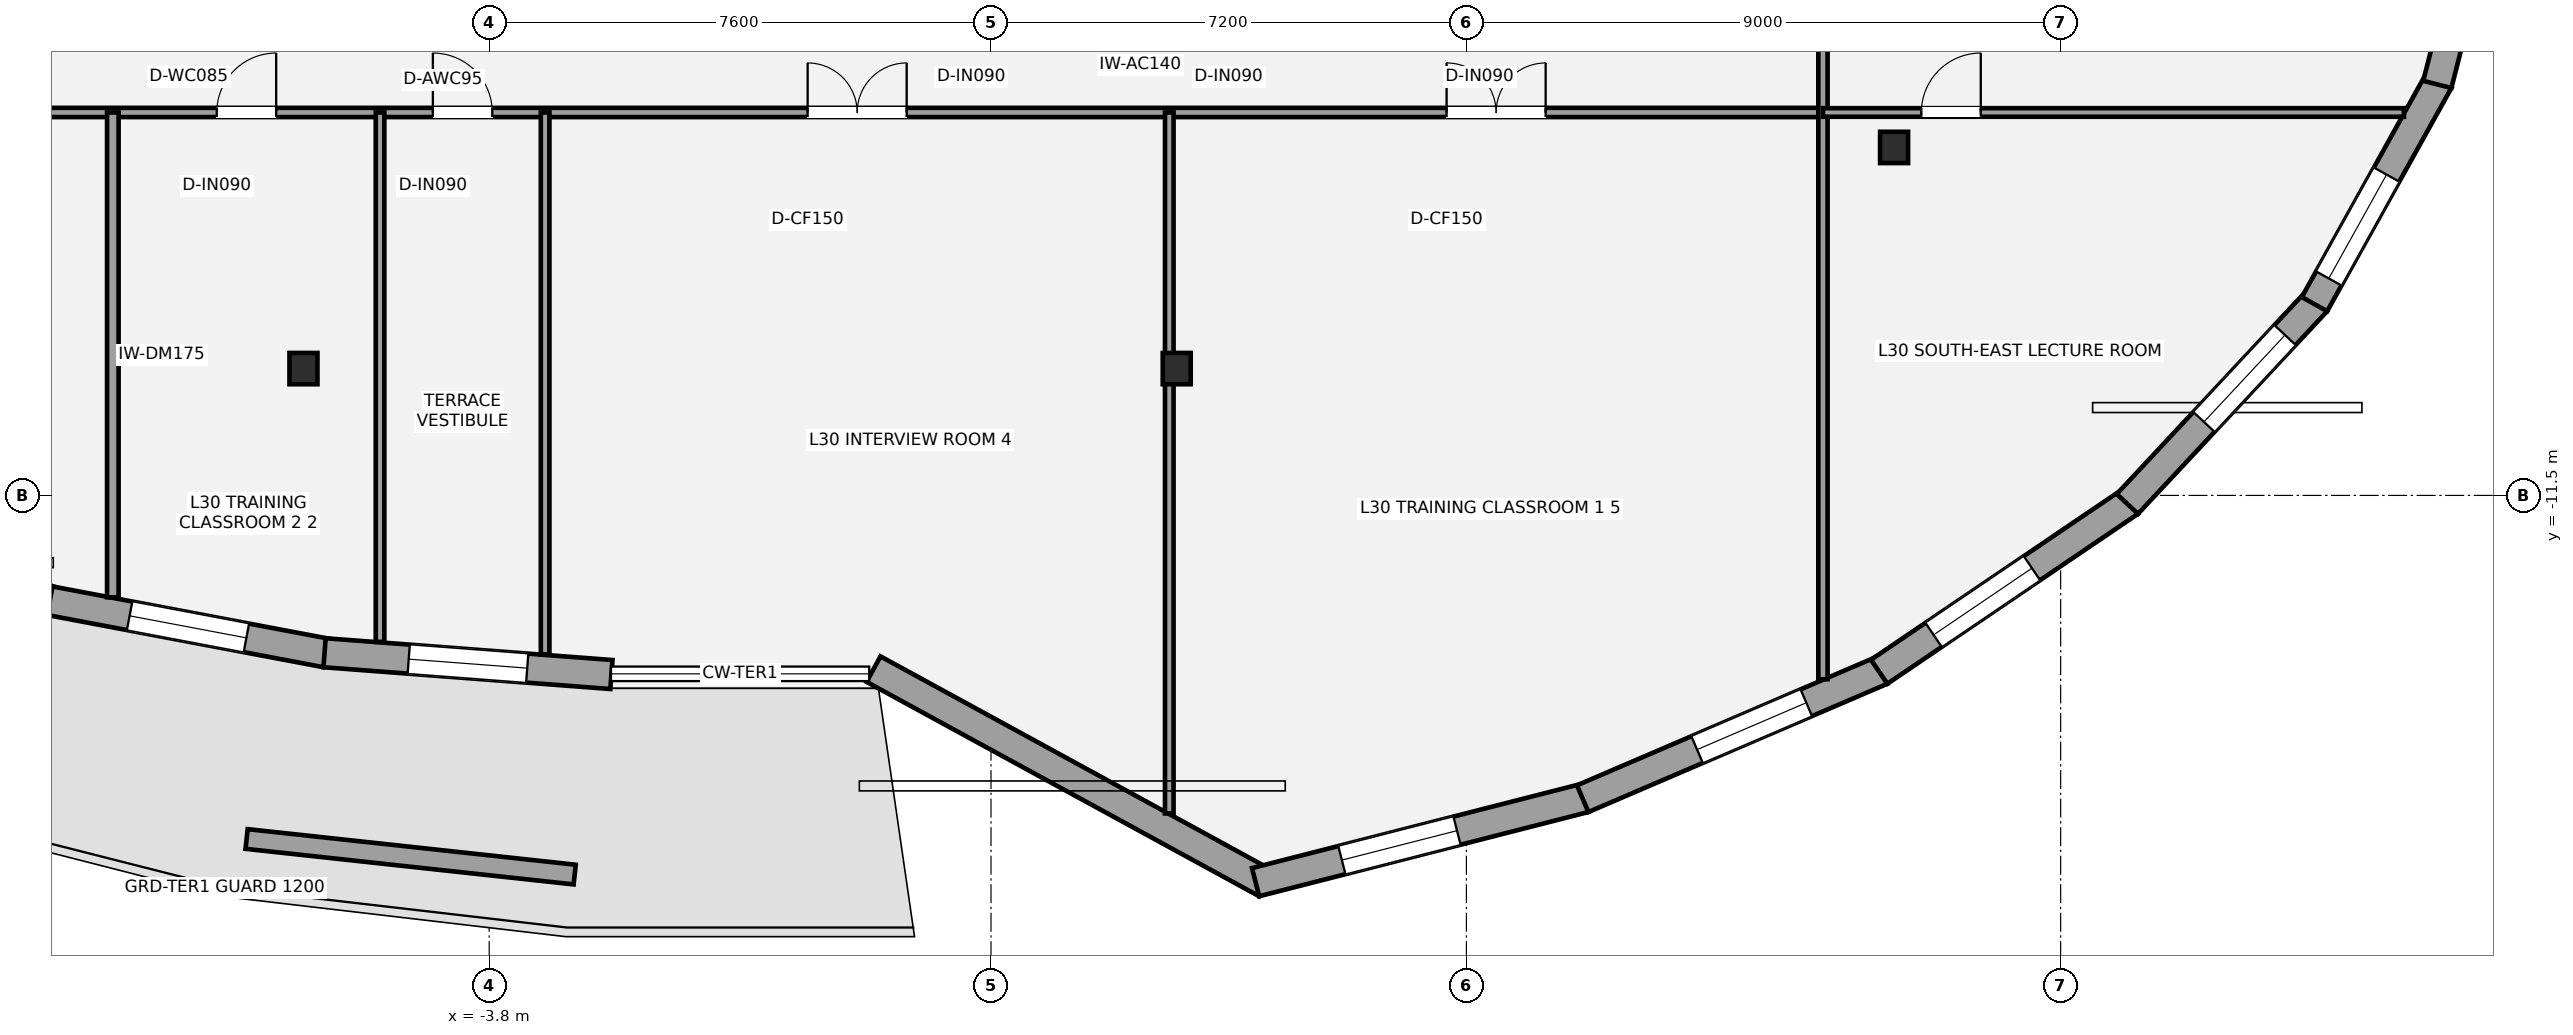
"""IFC4 building model, lengths in metres.
Left out: names, types, materials, properties, quantities, classifications, styles, units other than length and angle.
Written with IfcOpenShell. Run it as: python <this file> out.ifc"""

import sys

from ifc_helpers import new_model, si_unit, direction, frame, frame_2d, origin, origin_2d, place, context, subcontext, project, spatial, rectangle, i_section, extrude, element, fill, save


model = new_model("IFC4")
c1 = context("Model", 3, precision=1e-05, world=origin(), true_north=direction((0.0, 1.0)))
c2 = subcontext(c1, "Body", "Model", "MODEL_VIEW")
j1 = project(units=[si_unit("LENGTHUNIT", "METRE"), si_unit("PLANEANGLEUNIT", "RADIAN")], contexts=[c1])
p1 = place(None, origin())
s1 = spatial("IfcSite", under=j1, at=p1, CompositionType="ELEMENT")
p2 = place(p1, origin())
s2 = spatial("IfcBuilding", under=s1, at=p2, CompositionType="ELEMENT")
p3 = place(p2, frame((0.0, 0.0, 114.1)))
s3 = spatial("IfcBuildingStorey", under=s2, at=p3, CompositionType="ELEMENT", Elevation=114.1)
for number, where, z_axis, x_axis in (
    (1, (-6.613, -9.579, 0.0), (0.0, 0.0, 1.0), (1.0, 0.0, 0.0)),
    (2, (6.613, -9.579, 0.0), (0.0, 0.0, 1.0), (1.0, 0.0, 0.0)),
    (3, (17.477, -6.229, 0.0), (0.0, 0.0, 1.0), (1.0, 0.0, 0.0)),
):
    element("IfcColumn", number, at=place(p3, frame(where, z_axis=z_axis, x_axis=x_axis)), inside=s3, PredefinedType="COLUMN", context=c2, shape_type="SweptSolid", body=[
        extrude(i_section(OverallWidth=0.424, OverallDepth=0.474, WebThickness=0.048, FlangeThickness=0.077, at=origin_2d()), origin(), (0.0, 0.0, 1.0), 3.5),
    ])
p4 = place(p3, frame((-10.423, -13.104, 0.0), z_axis=(0.0, 0.0, 1.0), x_axis=(-0.944167257662, 0.329466522668, 0.0)))
e4 = element("IfcWall", 4, at=p4, inside=s3, PredefinedType="STANDARD", context=c2, shape_type="SweptSolid", body=[
    extrude(rectangle(XDim=4.184, YDim=0.44, at=frame_2d((2.092, 0.0))), origin(), (0.0, 0.0, 1.0), 2.532),
])
p5 = place(p4, frame((1.542, 0.0, 0.0)))
e5 = element("IfcOpeningElement", 5, at=p5, cuts=e4, PredefinedType="OPENING", context=c2, shape_type="SweptSolid", body=[
    extrude(rectangle(XDim=1.1, YDim=2.15, at=frame_2d((0.55, 1.075))), frame((0.0, 0.23, 0.0), z_axis=(0.0, -1.0, 0.0), x_axis=(1.0, 0.0, 0.0)), (0.0, 0.0, 1.0), 0.46),
])
p6 = place(p3, frame((-6.269, -13.886, 0.0), z_axis=(0.0, 0.0, 1.0), x_axis=(-0.982602489318, 0.185721156539, 0.0)))
e6 = element("IfcWall", 6, at=p6, inside=s3, PredefinedType="STANDARD", context=c2, shape_type="SweptSolid", body=[
    extrude(rectangle(XDim=4.259, YDim=0.44, at=frame_2d((2.13, 0.0))), origin(), (0.0, 0.0, 1.0), 2.532),
])
p7 = place(p6, frame((1.229, 0.0, 0.65)))
e7 = element("IfcOpeningElement", 7, at=p7, cuts=e6, PredefinedType="OPENING", context=c2, shape_type="SweptSolid", body=[
    extrude(rectangle(XDim=1.8, YDim=1.7, at=frame_2d((0.9, 0.85))), frame((0.0, 0.23, 0.0), z_axis=(0.0, -1.0, 0.0), x_axis=(1.0, 0.0, 0.0)), (0.0, 0.0, 1.0), 0.46),
])
p8 = place(p3, frame((-1.949, -14.213, 0.0), z_axis=(0.0, 0.0, 1.0), x_axis=(-0.997130139105, 0.075706576258, 0.0)))
e8 = element("IfcWall", 8, at=p8, inside=s3, PredefinedType="STANDARD", context=c2, shape_type="SweptSolid", body=[
    extrude(rectangle(XDim=4.357, YDim=0.44, at=frame_2d((2.178, 0.0))), origin(), (0.0, 0.0, 1.0), 2.532),
])
p9 = place(p8, frame((1.278, 0.0, 0.65)))
e9 = element("IfcOpeningElement", 9, at=p9, cuts=e8, PredefinedType="OPENING", context=c2, shape_type="SweptSolid", body=[
    extrude(rectangle(XDim=1.8, YDim=1.7, at=frame_2d((0.9, 0.85))), frame((0.0, 0.23, 0.0), z_axis=(0.0, -1.0, 0.0), x_axis=(1.0, 0.0, 0.0)), (0.0, 0.0, 1.0), 0.46),
])
p10 = place(p3, frame((7.967, -17.378, 0.0), z_axis=(0.0, 0.0, 1.0), x_axis=(-0.877693058441, 0.479223220602, 0.0)))
e10 = element("IfcWall", 10, at=p10, inside=s3, PredefinedType="STANDARD", context=c2, shape_type="SweptSolid", body=[
    extrude(rectangle(XDim=6.775, YDim=0.44, at=frame_2d((3.388, 0.0))), origin(), (0.0, 0.0, 1.0), 2.528),
])
p11 = place(p3, frame((12.793, -16.082, 0.0), z_axis=(0.0, 0.0, 1.0), x_axis=(-0.968802439575, -0.247834285507, 0.0)))
e11 = element("IfcWall", 11, at=p11, inside=s3, PredefinedType="STANDARD", context=c2, shape_type="SweptSolid", body=[
    extrude(rectangle(XDim=5.146, YDim=0.44, at=frame_2d((2.573, 0.0))), origin(), (0.0, 0.0, 1.0), 2.528),
])
p12 = place(p11, frame((1.998, 0.0, 0.65)))
e12 = element("IfcOpeningElement", 12, at=p12, cuts=e11, PredefinedType="OPENING", context=c2, shape_type="SweptSolid", body=[
    extrude(rectangle(XDim=1.8, YDim=1.7, at=frame_2d((0.9, 0.85))), frame((0.0, 0.23, 0.0), z_axis=(0.0, -1.0, 0.0), x_axis=(1.0, 0.0, 0.0)), (0.0, 0.0, 1.0), 0.46),
])
p13 = place(p3, frame((17.288, -14.151, 0.0), z_axis=(0.0, 0.0, 1.0), x_axis=(-0.919001414266, -0.39425423343, 0.0)))
e13 = element("IfcWall", 13, at=p13, inside=s3, PredefinedType="STANDARD", context=c2, shape_type="SweptSolid", body=[
    extrude(rectangle(XDim=4.926, YDim=0.44, at=frame_2d((2.463, 0.0))), origin(), (0.0, 0.0, 1.0), 2.528),
])
p14 = place(p13, frame((1.241, 0.0, 0.65)))
e14 = element("IfcOpeningElement", 14, at=p14, cuts=e13, PredefinedType="OPENING", context=c2, shape_type="SweptSolid", body=[
    extrude(rectangle(XDim=1.8, YDim=1.7, at=frame_2d((0.9, 0.85))), frame((0.0, 0.23, 0.0), z_axis=(0.0, -1.0, 0.0), x_axis=(1.0, 0.0, 0.0)), (0.0, 0.0, 1.0), 0.46),
])
p15 = place(p3, frame((21.048, -11.597, 0.0), z_axis=(0.0, 0.0, 1.0), x_axis=(-0.827717717125, -0.561144705719, 0.0)))
e15 = element("IfcWall", 15, at=p15, inside=s3, PredefinedType="STANDARD", context=c2, shape_type="SweptSolid", body=[
    extrude(rectangle(XDim=4.587, YDim=0.44, at=frame_2d((2.293, 0.0))), origin(), (0.0, 0.0, 1.0), 2.528),
])
p16 = place(p15, frame((1.791, 0.0, 0.65)))
e16 = element("IfcOpeningElement", 16, at=p16, cuts=e15, PredefinedType="OPENING", context=c2, shape_type="SweptSolid", body=[
    extrude(rectangle(XDim=1.8, YDim=1.7, at=frame_2d((0.9, 0.85))), frame((0.0, 0.23, 0.0), z_axis=(0.0, -1.0, 0.0), x_axis=(1.0, 0.0, 0.0)), (0.0, 0.0, 1.0), 0.46),
])
p17 = place(p3, frame((23.875, -8.56, 0.0), z_axis=(0.0, 0.0, 1.0), x_axis=(-0.682353469166, -0.73102239577, 0.0)))
e17 = element("IfcWall", 17, at=p17, inside=s3, PredefinedType="STANDARD", context=c2, shape_type="SweptSolid", body=[
    extrude(rectangle(XDim=4.199, YDim=0.44, at=frame_2d((2.099, 0.0))), origin(), (0.0, 0.0, 1.0), 2.528),
])
p18 = place(p17, frame((0.7, 0.0, 0.65)))
e18 = element("IfcOpeningElement", 18, at=p18, cuts=e17, PredefinedType="OPENING", context=c2, shape_type="SweptSolid", body=[
    extrude(rectangle(XDim=1.8, YDim=1.7, at=frame_2d((0.9, 0.85))), frame((0.0, 0.23, 0.0), z_axis=(0.0, -1.0, 0.0), x_axis=(1.0, 0.0, 0.0)), (0.0, 0.0, 1.0), 0.46),
])
p19 = place(p3, frame((25.725, -5.223, 0.0), z_axis=(0.0, 0.0, 1.0), x_axis=(-0.486285838125, -0.873799796086, 0.0)))
e19 = element("IfcWall", 19, at=p19, inside=s3, PredefinedType="STANDARD", context=c2, shape_type="SweptSolid", body=[
    extrude(rectangle(XDim=3.868, YDim=0.44, at=frame_2d((1.934, 0.0))), origin(), (0.0, 0.0, 1.0), 2.528),
])
p20 = place(p19, frame((1.623, 0.0, 0.65)))
e20 = element("IfcOpeningElement", 20, at=p20, cuts=e19, PredefinedType="OPENING", context=c2, shape_type="SweptSolid", body=[
    extrude(rectangle(XDim=1.8, YDim=1.7, at=frame_2d((0.9, 0.85))), frame((0.0, 0.23, 0.0), z_axis=(0.0, -1.0, 0.0), x_axis=(1.0, 0.0, 0.0)), (0.0, 0.0, 1.0), 0.46),
])
p21 = place(p3, frame((26.607, -1.736, 0.0), z_axis=(0.0, 0.0, 1.0), x_axis=(-0.247172296022, -0.968971545547, 0.0)))
e21 = element("IfcWall", 21, at=p21, inside=s3, PredefinedType="STANDARD", context=c2, shape_type="SweptSolid", body=[
    extrude(rectangle(XDim=3.653, YDim=0.44, at=frame_2d((1.826, 0.0))), origin(), (0.0, 0.0, 1.0), 2.528),
])
p22 = place(p21, frame((0.345, 0.0, 0.65)))
e22 = element("IfcOpeningElement", 22, at=p22, cuts=e21, PredefinedType="OPENING", context=c2, shape_type="SweptSolid", body=[
    extrude(rectangle(XDim=1.8, YDim=1.7, at=frame_2d((0.9, 0.85))), frame((0.0, 0.23, 0.0), z_axis=(0.0, -1.0, 0.0), x_axis=(1.0, 0.0, 0.0)), (0.0, 0.0, 1.0), 0.46),
])
p23 = place(p3, frame((-7.474, -16.704, 0.0), z_axis=(0.0, 0.0, 1.0), x_axis=(0.994167482167, -0.107847194685, 0.0)))
e23 = element("IfcWall", 23, at=p23, inside=s3, PredefinedType="PARAPET", context=c2, shape_type="SweptSolid", body=[
    extrude(rectangle(XDim=4.998, YDim=0.3, at=frame_2d((2.499, 0.0))), origin(), (0.0, 0.0, 1.0), 0.45),
])
p24 = place(p3, frame((-17.8, -5.7, 0.0), z_axis=(0.0, 0.0, 1.0), x_axis=(1.0, 0.0, 0.0)))
e24 = element("IfcWall", 24, at=p24, inside=s3, PredefinedType="PARTITIONING", context=c2, shape_type="SweptSolid", body=[
    extrude(rectangle(XDim=34.2, YDim=0.14, at=frame_2d((17.1, 0.0))), origin(), (0.0, 0.0, 1.0), 2.688),
])
p25 = place(p24, frame((3.4, 0.0, 0.0)))
e25 = element("IfcOpeningElement", 25, at=p25, cuts=e24, PredefinedType="OPENING", context=c2, shape_type="SweptSolid", body=[
    extrude(rectangle(XDim=1.5, YDim=2.15, at=frame_2d((0.75, 1.075))), frame((0.0, 0.08, 0.0), z_axis=(0.0, -1.0, 0.0), x_axis=(1.0, 0.0, 0.0)), (0.0, 0.0, 1.0), 0.16),
])
p26 = place(p24, frame((9.874, 0.0, 0.0)))
e26 = element("IfcOpeningElement", 26, at=p26, cuts=e24, PredefinedType="OPENING", context=c2, shape_type="SweptSolid", body=[
    extrude(rectangle(XDim=0.9, YDim=2.1, at=frame_2d((0.45, 1.05))), frame((0.0, 0.08, 0.0), z_axis=(0.0, -1.0, 0.0), x_axis=(1.0, 0.0, 0.0)), (0.0, 0.0, 1.0), 0.16),
])
p27 = place(p24, frame((13.147, 0.0, 0.0)))
e27 = element("IfcOpeningElement", 27, at=p27, cuts=e24, PredefinedType="OPENING", context=c2, shape_type="SweptSolid", body=[
    extrude(rectangle(XDim=0.9, YDim=2.1, at=frame_2d((0.45, 1.05))), frame((0.0, 0.08, 0.0), z_axis=(0.0, -1.0, 0.0), x_axis=(1.0, 0.0, 0.0)), (0.0, 0.0, 1.0), 0.16),
])
p28 = place(p24, frame((18.823, 0.0, 0.0)))
e28 = element("IfcOpeningElement", 28, at=p28, cuts=e24, PredefinedType="OPENING", context=c2, shape_type="SweptSolid", body=[
    extrude(rectangle(XDim=1.5, YDim=2.15, at=frame_2d((0.75, 1.075))), frame((0.0, 0.08, 0.0), z_axis=(0.0, -1.0, 0.0), x_axis=(1.0, 0.0, 0.0)), (0.0, 0.0, 1.0), 0.16),
])
p29 = place(p24, frame((28.5, 0.0, 0.0)))
e29 = element("IfcOpeningElement", 29, at=p29, cuts=e24, PredefinedType="OPENING", context=c2, shape_type="SweptSolid", body=[
    extrude(rectangle(XDim=1.5, YDim=2.15, at=frame_2d((0.75, 1.075))), frame((0.0, 0.08, 0.0), z_axis=(0.0, -1.0, 0.0), x_axis=(1.0, 0.0, 0.0)), (0.0, 0.0, 1.0), 0.16),
])
p30 = place(p3, frame((16.4, -14.284, 0.0), z_axis=(0.0, 0.0, 1.0), x_axis=(0.0, 1.0, 0.0)))
e30 = element("IfcWall", 30, at=p30, inside=s3, PredefinedType="PARTITIONING", context=c2, shape_type="SweptSolid", body=[
    extrude(rectangle(XDim=21.834, YDim=0.14, at=frame_2d((10.917, 0.0))), origin(), (0.0, 0.0, 1.0), 2.763),
])
p31 = place(p30, frame((11.383, 0.0, 0.0)))
e31 = element("IfcOpeningElement", 31, at=p31, cuts=e30, PredefinedType="OPENING", context=c2, shape_type="SweptSolid", body=[
    extrude(rectangle(XDim=0.9, YDim=2.1, at=frame_2d((0.45, 1.05))), frame((0.0, 0.08, 0.0), z_axis=(0.0, -1.0, 0.0), x_axis=(1.0, 0.0, 0.0)), (0.0, 0.0, 1.0), 0.16),
])
p32 = place(p30, frame((16.533, 0.0, 0.0)))
e32 = element("IfcOpeningElement", 32, at=p32, cuts=e30, PredefinedType="OPENING", context=c2, shape_type="SweptSolid", body=[
    extrude(rectangle(XDim=0.9, YDim=2.1, at=frame_2d((0.45, 1.05))), frame((0.0, 0.08, 0.0), z_axis=(0.0, -1.0, 0.0), x_axis=(1.0, 0.0, 0.0)), (0.0, 0.0, 1.0), 0.16),
])
p33 = place(p30, frame((19.908, 0.0, 0.0)))
e33 = element("IfcOpeningElement", 33, at=p33, cuts=e30, PredefinedType="OPENING", context=c2, shape_type="SweptSolid", body=[
    extrude(rectangle(XDim=0.9, YDim=2.1, at=frame_2d((0.45, 1.05))), frame((0.0, 0.08, 0.0), z_axis=(0.0, -1.0, 0.0), x_axis=(1.0, 0.0, 0.0)), (0.0, 0.0, 1.0), 0.16),
])
p34 = place(p3, frame((-9.5, -13.043, 0.0), z_axis=(0.0, 0.0, 1.0), x_axis=(0.0, 1.0, 0.0)))
e34 = element("IfcWall", 34, at=p34, inside=s3, PredefinedType="PARTITIONING", context=c2, shape_type="SweptSolid", body=[
    extrude(rectangle(XDim=7.343, YDim=0.175, at=frame_2d((3.672, 0.0))), origin(), (0.0, 0.0, 1.0), 3.31),
])
p35 = place(p3, frame((-5.453, -13.718, 0.0), z_axis=(0.0, 0.0, 1.0), x_axis=(0.0, 1.0, 0.0)))
e35 = element("IfcWall", 35, at=p35, inside=s3, PredefinedType="PARTITIONING", context=c2, shape_type="SweptSolid", body=[
    extrude(rectangle(XDim=8.018, YDim=0.13, at=frame_2d((4.009, 0.0))), origin(), (0.0, 0.0, 1.0), 2.763),
])
p36 = place(p3, frame((-2.953, -13.908, 0.0), z_axis=(0.0, 0.0, 1.0), x_axis=(0.0, 1.0, 0.0)))
e36 = element("IfcWall", 36, at=p36, inside=s3, PredefinedType="PARTITIONING", context=c2, shape_type="SweptSolid", body=[
    extrude(rectangle(XDim=8.208, YDim=0.13, at=frame_2d((4.104, 0.0))), origin(), (0.0, 0.0, 1.0), 2.763),
])
p37 = place(p3, frame((6.5, -16.317, 0.0), z_axis=(0.0, 0.0, 1.0), x_axis=(0.0, 1.0, 0.0)))
e37 = element("IfcWall", 37, at=p37, inside=s3, PredefinedType="PARTITIONING", context=c2, shape_type="SweptSolid", body=[
    extrude(rectangle(XDim=10.617, YDim=0.13, at=frame_2d((5.308, 0.0))), origin(), (0.0, 0.0, 1.0), 2.763),
])
p38 = place(p3, frame((16.4, -5.7, 0.0), z_axis=(0.0, 0.0, 1.0), x_axis=(1.0, 0.0, 0.0)))
e38 = element("IfcWall", 38, at=p38, inside=s3, PredefinedType="PARTITIONING", context=c2, shape_type="SweptSolid", body=[
    extrude(rectangle(XDim=8.799, YDim=0.13, at=frame_2d((4.399, 0.0))), origin(), (0.0, 0.0, 1.0), 2.688),
])
p39 = place(p38, frame((1.49, 0.0, 0.0)))
e39 = element("IfcOpeningElement", 39, at=p39, cuts=e38, PredefinedType="OPENING", context=c2, shape_type="SweptSolid", body=[
    extrude(rectangle(XDim=0.9, YDim=2.1, at=frame_2d((0.45, 1.05))), frame((0.0, 0.075, 0.0), z_axis=(0.0, -1.0, 0.0), x_axis=(1.0, 0.0, 0.0)), (0.0, 0.0, 1.0), 0.15),
])
p40 = place(p7, origin())
e40 = element("IfcWindow", 40, at=p40, inside=s3, PartitioningType="SINGLE_PANEL", PredefinedType="WINDOW", context=c2, shape_type="SweptSolid", body=[
    extrude(rectangle(XDim=1.8, YDim=1.7, at=frame_2d((0.9, 0.85))), frame((0.0, -0.01, 0.0), z_axis=(0.0, -1.0, 0.0), x_axis=(1.0, 0.0, 0.0)), (0.0, 0.0, 1.0), 0.06),
])
fill(e7, e40)
p41 = place(p9, origin())
e41 = element("IfcWindow", 41, at=p41, inside=s3, PartitioningType="SINGLE_PANEL", PredefinedType="WINDOW", context=c2, shape_type="SweptSolid", body=[
    extrude(rectangle(XDim=1.8, YDim=1.7, at=frame_2d((0.9, 0.85))), frame((0.0, -0.01, 0.0), z_axis=(0.0, -1.0, 0.0), x_axis=(1.0, 0.0, 0.0)), (0.0, 0.0, 1.0), 0.06),
])
fill(e9, e41)
p42 = place(p12, origin())
e42 = element("IfcWindow", 42, at=p42, inside=s3, PartitioningType="SINGLE_PANEL", PredefinedType="WINDOW", context=c2, shape_type="SweptSolid", body=[
    extrude(rectangle(XDim=1.8, YDim=1.7, at=frame_2d((0.9, 0.85))), frame((0.0, -0.01, 0.0), z_axis=(0.0, -1.0, 0.0), x_axis=(1.0, 0.0, 0.0)), (0.0, 0.0, 1.0), 0.06),
])
fill(e12, e42)
p43 = place(p14, origin())
e43 = element("IfcWindow", 43, at=p43, inside=s3, PartitioningType="SINGLE_PANEL", PredefinedType="WINDOW", context=c2, shape_type="SweptSolid", body=[
    extrude(rectangle(XDim=1.8, YDim=1.7, at=frame_2d((0.9, 0.85))), frame((0.0, -0.01, 0.0), z_axis=(0.0, -1.0, 0.0), x_axis=(1.0, 0.0, 0.0)), (0.0, 0.0, 1.0), 0.06),
])
fill(e14, e43)
p44 = place(p16, origin())
e44 = element("IfcWindow", 44, at=p44, inside=s3, PartitioningType="SINGLE_PANEL", PredefinedType="WINDOW", context=c2, shape_type="SweptSolid", body=[
    extrude(rectangle(XDim=1.8, YDim=1.7, at=frame_2d((0.9, 0.85))), frame((0.0, -0.01, 0.0), z_axis=(0.0, -1.0, 0.0), x_axis=(1.0, 0.0, 0.0)), (0.0, 0.0, 1.0), 0.06),
])
fill(e16, e44)
p45 = place(p18, origin())
e45 = element("IfcWindow", 45, at=p45, inside=s3, PartitioningType="SINGLE_PANEL", PredefinedType="WINDOW", context=c2, shape_type="SweptSolid", body=[
    extrude(rectangle(XDim=1.8, YDim=1.7, at=frame_2d((0.9, 0.85))), frame((0.0, -0.01, 0.0), z_axis=(0.0, -1.0, 0.0), x_axis=(1.0, 0.0, 0.0)), (0.0, 0.0, 1.0), 0.06),
])
fill(e18, e45)
p46 = place(p20, origin())
e46 = element("IfcWindow", 46, at=p46, inside=s3, PartitioningType="SINGLE_PANEL", PredefinedType="WINDOW", context=c2, shape_type="SweptSolid", body=[
    extrude(rectangle(XDim=1.8, YDim=1.7, at=frame_2d((0.9, 0.85))), frame((0.0, -0.01, 0.0), z_axis=(0.0, -1.0, 0.0), x_axis=(1.0, 0.0, 0.0)), (0.0, 0.0, 1.0), 0.06),
])
fill(e20, e46)
p47 = place(p26, origin())
e47 = element("IfcDoor", 47, at=p47, inside=s3, OperationType="SINGLE_SWING_RIGHT", PredefinedType="DOOR", context=c2, shape_type="SweptSolid", body=[
    extrude(rectangle(XDim=0.9, YDim=2.1, at=frame_2d((0.45, 1.05))), frame((0.0, 0.025, 0.0), z_axis=(0.0, -1.0, 0.0), x_axis=(1.0, 0.0, 0.0)), (0.0, 0.0, 1.0), 0.05),
])
fill(e26, e47)
p48 = place(p27, origin())
e48 = element("IfcDoor", 48, at=p48, inside=s3, OperationType="SINGLE_SWING_LEFT", PredefinedType="DOOR", context=c2, shape_type="SweptSolid", body=[
    extrude(rectangle(XDim=0.9, YDim=2.1, at=frame_2d((0.45, 1.05))), frame((0.0, 0.025, 0.0), z_axis=(0.0, -1.0, 0.0), x_axis=(1.0, 0.0, 0.0)), (0.0, 0.0, 1.0), 0.05),
])
fill(e27, e48)
p49 = place(p28, origin())
e49 = element("IfcDoor", 49, at=p49, inside=s3, OperationType="DOUBLE_DOOR_SINGLE_SWING", PredefinedType="DOOR", context=c2, shape_type="SweptSolid", body=[
    extrude(rectangle(XDim=1.5, YDim=2.15, at=frame_2d((0.75, 1.075))), frame((0.0, 0.025, 0.0), z_axis=(0.0, -1.0, 0.0), x_axis=(1.0, 0.0, 0.0)), (0.0, 0.0, 1.0), 0.05),
])
fill(e28, e49)
p50 = place(p29, origin())
e50 = element("IfcDoor", 50, at=p50, inside=s3, OperationType="DOUBLE_DOOR_SINGLE_SWING", PredefinedType="DOOR", context=c2, shape_type="SweptSolid", body=[
    extrude(rectangle(XDim=1.5, YDim=2.15, at=frame_2d((0.75, 1.075))), frame((0.0, 0.025, 0.0), z_axis=(0.0, -1.0, 0.0), x_axis=(1.0, 0.0, 0.0)), (0.0, 0.0, 1.0), 0.05),
])
fill(e29, e50)
p51 = place(p39, origin())
e51 = element("IfcDoor", 51, at=p51, inside=s3, OperationType="SINGLE_SWING_RIGHT", PredefinedType="DOOR", context=c2, shape_type="SweptSolid", body=[
    extrude(rectangle(XDim=0.9, YDim=2.1, at=frame_2d((0.45, 1.05))), frame((0.0, 0.025, 0.0), z_axis=(0.0, -1.0, 0.0), x_axis=(1.0, 0.0, 0.0)), (0.0, 0.0, 1.0), 0.05),
])
fill(e39, e51)
save(model, sys.argv[1])
